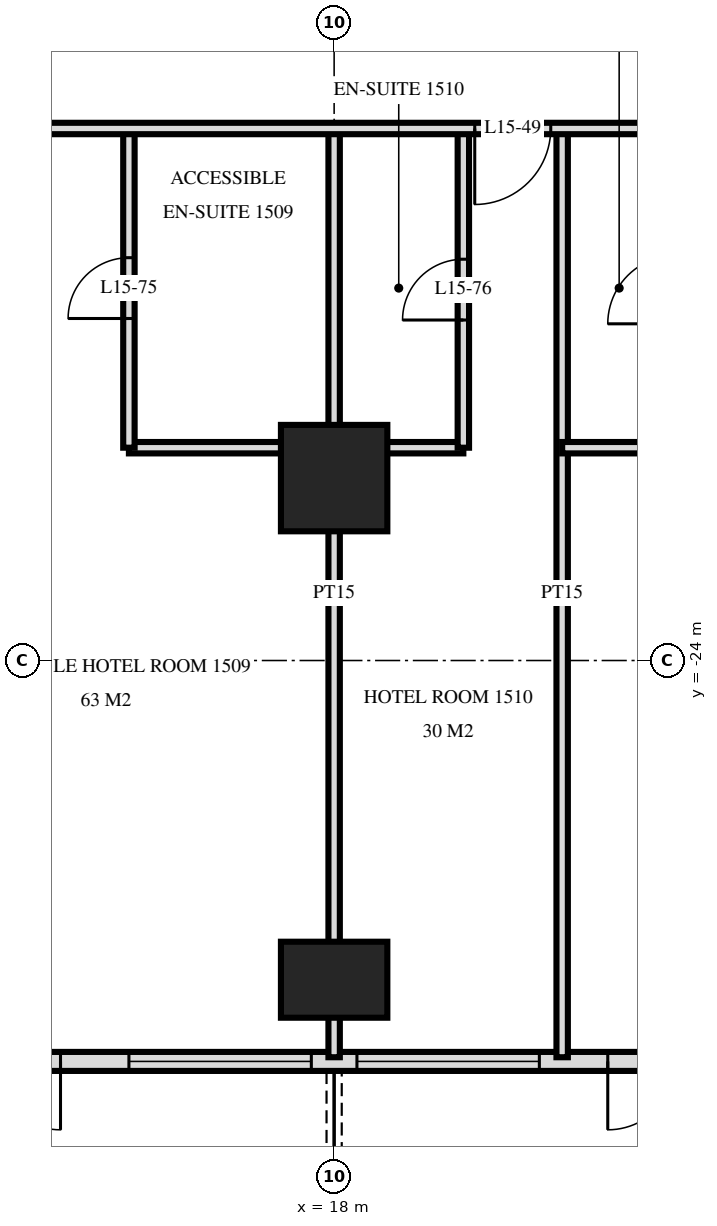
"""IFC4 building model, lengths in metres.
Left out: names, types, materials, properties, quantities, classifications, styles, units other than length and angle.
Written with IfcOpenShell. Run it as: python <this file> out.ifc"""

import sys

from ifc_helpers import new_model, si_unit, direction, frame, frame_2d, origin, origin_2d, place, context, subcontext, project, spatial, rectangle, extrude, element, fill, save


model = new_model("IFC4")
c1 = context("Model", 3, precision=1e-05, world=origin(), true_north=direction((0.0, 1.0)))
c2 = subcontext(c1, "Body", "Model", "MODEL_VIEW")
j1 = project(units=[si_unit("LENGTHUNIT", "METRE"), si_unit("PLANEANGLEUNIT", "RADIAN")], contexts=[c1])
p1 = place(None, origin())
s1 = spatial("IfcSite", under=j1, at=p1, CompositionType="ELEMENT")
p2 = place(p1, origin())
s2 = spatial("IfcBuilding", under=s1, at=p2, CompositionType="ELEMENT")
p3 = place(p2, frame((0.0, 0.0, 63.6)))
s3 = spatial("IfcBuildingStorey", under=s2, at=p3, CompositionType="ELEMENT", Elevation=63.6)
p4 = place(p3, frame((18.0, -28.2, 0.0), z_axis=(0.0, 0.0, 1.0), x_axis=(1.0, 0.0, 0.0)))
e1 = element("IfcColumn", 1, at=p4, inside=s3, PredefinedType="COLUMN", context=c2, shape_type="SweptSolid", body=[
    extrude(rectangle(XDim=1.4, YDim=1.0, at=origin_2d()), origin(), (0.0, 0.0, 1.0), 3.6),
])
p5 = place(p3, frame((18.0, -21.6, 0.0), z_axis=(0.0, 0.0, 1.0), x_axis=(1.0, 0.0, 0.0)))
e2 = element("IfcColumn", 2, at=p5, inside=s3, PredefinedType="COLUMN", context=c2, shape_type="SweptSolid", body=[
    extrude(rectangle(XDim=1.4, YDim=1.4, at=origin_2d()), origin(), (0.0, 0.0, 1.0), 3.6),
])
p6 = place(p3, frame((-28.775, -29.275, 0.0), z_axis=(0.0, 0.0, 1.0), x_axis=(1.0, 0.0, 0.0)))
e3 = element("IfcWall", 3, at=p6, inside=s3, PredefinedType="SOLIDWALL", context=c2, shape_type="SweptSolid", body=[
    extrude(rectangle(XDim=57.551, YDim=0.25, at=frame_2d((28.775, 0.0))), origin(), (0.0, 0.0, 1.0), 3.32),
])
p7 = place(p6, frame((0.575, 0.0, 0.0)))
e4 = element("IfcOpeningElement", 4, at=p7, cuts=e3, PredefinedType="OPENING", context=c2, shape_type="SweptSolid", body=[
    extrude(rectangle(XDim=1.8, YDim=2.4, at=frame_2d((0.9, 1.2))), frame((0.0, 0.135, 0.0), z_axis=(0.0, -1.0, 0.0), x_axis=(1.0, 0.0, 0.0)), (0.0, 0.0, 1.0), 0.27),
])
p8 = place(p6, frame((5.375, 0.0, 0.0)))
e5 = element("IfcOpeningElement", 5, at=p8, cuts=e3, PredefinedType="OPENING", context=c2, shape_type="SweptSolid", body=[
    extrude(rectangle(XDim=1.8, YDim=2.4, at=frame_2d((0.9, 1.2))), frame((0.0, 0.135, 0.0), z_axis=(0.0, -1.0, 0.0), x_axis=(1.0, 0.0, 0.0)), (0.0, 0.0, 1.0), 0.27),
])
p9 = place(p6, frame((8.075, 0.0, 0.3)))
e6 = element("IfcOpeningElement", 6, at=p9, cuts=e3, PredefinedType="OPENING", context=c2, shape_type="SweptSolid", body=[
    extrude(rectangle(XDim=2.4, YDim=2.1, at=frame_2d((1.2, 1.05))), frame((0.0, 0.135, 0.0), z_axis=(0.0, -1.0, 0.0), x_axis=(1.0, 0.0, 0.0)), (0.0, 0.0, 1.0), 0.27),
])
p10 = place(p6, frame((11.375, 0.0, 0.0)))
e7 = element("IfcOpeningElement", 7, at=p10, cuts=e3, PredefinedType="OPENING", context=c2, shape_type="SweptSolid", body=[
    extrude(rectangle(XDim=1.8, YDim=2.4, at=frame_2d((0.9, 1.2))), frame((0.0, 0.135, 0.0), z_axis=(0.0, -1.0, 0.0), x_axis=(1.0, 0.0, 0.0)), (0.0, 0.0, 1.0), 0.27),
])
p11 = place(p6, frame((14.075, 0.0, 0.3)))
e8 = element("IfcOpeningElement", 8, at=p11, cuts=e3, PredefinedType="OPENING", context=c2, shape_type="SweptSolid", body=[
    extrude(rectangle(XDim=2.4, YDim=2.1, at=frame_2d((1.2, 1.05))), frame((0.0, 0.135, 0.0), z_axis=(0.0, -1.0, 0.0), x_axis=(1.0, 0.0, 0.0)), (0.0, 0.0, 1.0), 0.27),
])
p12 = place(p6, frame((17.375, 0.0, 0.0)))
e9 = element("IfcOpeningElement", 9, at=p12, cuts=e3, PredefinedType="OPENING", context=c2, shape_type="SweptSolid", body=[
    extrude(rectangle(XDim=1.8, YDim=2.4, at=frame_2d((0.9, 1.2))), frame((0.0, 0.135, 0.0), z_axis=(0.0, -1.0, 0.0), x_axis=(1.0, 0.0, 0.0)), (0.0, 0.0, 1.0), 0.27),
])
p13 = place(p6, frame((20.075, 0.0, 0.3)))
e10 = element("IfcOpeningElement", 10, at=p13, cuts=e3, PredefinedType="OPENING", context=c2, shape_type="SweptSolid", body=[
    extrude(rectangle(XDim=2.4, YDim=2.1, at=frame_2d((1.2, 1.05))), frame((0.0, 0.135, 0.0), z_axis=(0.0, -1.0, 0.0), x_axis=(1.0, 0.0, 0.0)), (0.0, 0.0, 1.0), 0.27),
])
p14 = place(p6, frame((23.075, 0.0, 0.3)))
e11 = element("IfcOpeningElement", 11, at=p14, cuts=e3, PredefinedType="OPENING", context=c2, shape_type="SweptSolid", body=[
    extrude(rectangle(XDim=2.4, YDim=2.1, at=frame_2d((1.2, 1.05))), frame((0.0, 0.135, 0.0), z_axis=(0.0, -1.0, 0.0), x_axis=(1.0, 0.0, 0.0)), (0.0, 0.0, 1.0), 0.27),
])
p15 = place(p6, frame((26.375, 0.0, 0.0)))
e12 = element("IfcOpeningElement", 12, at=p15, cuts=e3, PredefinedType="OPENING", context=c2, shape_type="SweptSolid", body=[
    extrude(rectangle(XDim=1.8, YDim=2.4, at=frame_2d((0.9, 1.2))), frame((0.0, 0.135, 0.0), z_axis=(0.0, -1.0, 0.0), x_axis=(1.0, 0.0, 0.0)), (0.0, 0.0, 1.0), 0.27),
])
p16 = place(p6, frame((29.075, 0.0, 0.3)))
e13 = element("IfcOpeningElement", 13, at=p16, cuts=e3, PredefinedType="OPENING", context=c2, shape_type="SweptSolid", body=[
    extrude(rectangle(XDim=2.4, YDim=2.1, at=frame_2d((1.2, 1.05))), frame((0.0, 0.135, 0.0), z_axis=(0.0, -1.0, 0.0), x_axis=(1.0, 0.0, 0.0)), (0.0, 0.0, 1.0), 0.27),
])
p17 = place(p6, frame((32.375, 0.0, 0.0)))
e14 = element("IfcOpeningElement", 14, at=p17, cuts=e3, PredefinedType="OPENING", context=c2, shape_type="SweptSolid", body=[
    extrude(rectangle(XDim=1.8, YDim=2.4, at=frame_2d((0.9, 1.2))), frame((0.0, 0.135, 0.0), z_axis=(0.0, -1.0, 0.0), x_axis=(1.0, 0.0, 0.0)), (0.0, 0.0, 1.0), 0.27),
])
p18 = place(p6, frame((35.375, 0.0, 0.0)))
e15 = element("IfcOpeningElement", 15, at=p18, cuts=e3, PredefinedType="OPENING", context=c2, shape_type="SweptSolid", body=[
    extrude(rectangle(XDim=1.8, YDim=2.4, at=frame_2d((0.9, 1.2))), frame((0.0, 0.135, 0.0), z_axis=(0.0, -1.0, 0.0), x_axis=(1.0, 0.0, 0.0)), (0.0, 0.0, 1.0), 0.27),
])
p19 = place(p6, frame((38.075, 0.0, 0.3)))
e16 = element("IfcOpeningElement", 16, at=p19, cuts=e3, PredefinedType="OPENING", context=c2, shape_type="SweptSolid", body=[
    extrude(rectangle(XDim=2.4, YDim=2.1, at=frame_2d((1.2, 1.05))), frame((0.0, 0.135, 0.0), z_axis=(0.0, -1.0, 0.0), x_axis=(1.0, 0.0, 0.0)), (0.0, 0.0, 1.0), 0.27),
])
p20 = place(p6, frame((41.375, 0.0, 0.0)))
e17 = element("IfcOpeningElement", 17, at=p20, cuts=e3, PredefinedType="OPENING", context=c2, shape_type="SweptSolid", body=[
    extrude(rectangle(XDim=1.8, YDim=2.4, at=frame_2d((0.9, 1.2))), frame((0.0, 0.135, 0.0), z_axis=(0.0, -1.0, 0.0), x_axis=(1.0, 0.0, 0.0)), (0.0, 0.0, 1.0), 0.27),
])
p21 = place(p6, frame((44.075, 0.0, 0.3)))
e18 = element("IfcOpeningElement", 18, at=p21, cuts=e3, PredefinedType="OPENING", context=c2, shape_type="SweptSolid", body=[
    extrude(rectangle(XDim=2.4, YDim=2.1, at=frame_2d((1.2, 1.05))), frame((0.0, 0.135, 0.0), z_axis=(0.0, -1.0, 0.0), x_axis=(1.0, 0.0, 0.0)), (0.0, 0.0, 1.0), 0.27),
])
p22 = place(p6, frame((47.075, 0.0, 0.3)))
e19 = element("IfcOpeningElement", 19, at=p22, cuts=e3, PredefinedType="OPENING", context=c2, shape_type="SweptSolid", body=[
    extrude(rectangle(XDim=2.4, YDim=2.1, at=frame_2d((1.2, 1.05))), frame((0.0, 0.135, 0.0), z_axis=(0.0, -1.0, 0.0), x_axis=(1.0, 0.0, 0.0)), (0.0, 0.0, 1.0), 0.27),
])
p23 = place(p6, frame((50.375, 0.0, 0.0)))
e20 = element("IfcOpeningElement", 20, at=p23, cuts=e3, PredefinedType="OPENING", context=c2, shape_type="SweptSolid", body=[
    extrude(rectangle(XDim=1.8, YDim=2.4, at=frame_2d((0.9, 1.2))), frame((0.0, 0.135, 0.0), z_axis=(0.0, -1.0, 0.0), x_axis=(1.0, 0.0, 0.0)), (0.0, 0.0, 1.0), 0.27),
])
p24 = place(p6, frame((53.375, 0.0, 0.0)))
e21 = element("IfcOpeningElement", 21, at=p24, cuts=e3, PredefinedType="OPENING", context=c2, shape_type="SweptSolid", body=[
    extrude(rectangle(XDim=1.8, YDim=2.4, at=frame_2d((0.9, 1.2))), frame((0.0, 0.135, 0.0), z_axis=(0.0, -1.0, 0.0), x_axis=(1.0, 0.0, 0.0)), (0.0, 0.0, 1.0), 0.27),
])
p25 = place(p3, frame((21.0, -29.22, 0.0), z_axis=(0.0, 0.0, 1.0), x_axis=(0.0, 1.0, 0.0)))
e22 = element("IfcWall", 22, at=p25, inside=s3, PredefinedType="PARTITIONING", context=c2, shape_type="SweptSolid", body=[
    extrude(rectangle(XDim=12.22, YDim=0.15, at=frame_2d((6.11, 0.0))), origin(), (0.0, 0.0, 1.0), 3.32),
])
p26 = place(p3, frame((19.7, -21.2, 0.0), z_axis=(0.0, 0.0, 1.0), x_axis=(0.0, 1.0, 0.0)))
e23 = element("IfcWall", 23, at=p26, inside=s3, PredefinedType="PARTITIONING", context=c2, shape_type="SweptSolid", body=[
    extrude(rectangle(XDim=4.2, YDim=0.15, at=frame_2d((2.1, 0.0))), origin(), (0.0, 0.0, 1.0), 3.32),
])
p27 = place(p26, frame((1.68, 0.0, 0.0)))
e24 = element("IfcOpeningElement", 24, at=p27, cuts=e23, PredefinedType="OPENING", context=c2, shape_type="SweptSolid", body=[
    extrude(rectangle(XDim=0.8, YDim=2.1, at=frame_2d((0.4, 1.05))), frame((0.0, 0.085, 0.0), z_axis=(0.0, -1.0, 0.0), x_axis=(1.0, 0.0, 0.0)), (0.0, 0.0, 1.0), 0.17),
])
p28 = place(p3, frame((18.0, -29.22, 0.0), z_axis=(0.0, 0.0, 1.0), x_axis=(0.0, 1.0, 0.0)))
e25 = element("IfcWall", 25, at=p28, inside=s3, PredefinedType="PARTITIONING", context=c2, shape_type="SweptSolid", body=[
    extrude(rectangle(XDim=12.22, YDim=0.15, at=frame_2d((6.11, 0.0))), origin(), (0.0, 0.0, 1.0), 3.32),
])
p29 = place(p3, frame((15.3, -21.2, 0.0), z_axis=(0.0, 0.0, 1.0), x_axis=(0.0, 1.0, 0.0)))
e26 = element("IfcWall", 26, at=p29, inside=s3, PredefinedType="PARTITIONING", context=c2, shape_type="SweptSolid", body=[
    extrude(rectangle(XDim=4.2, YDim=0.15, at=frame_2d((2.1, 0.0))), origin(), (0.0, 0.0, 1.0), 3.32),
])
p30 = place(p29, frame((1.7, 0.0, 0.0)))
e27 = element("IfcOpeningElement", 27, at=p30, cuts=e26, PredefinedType="OPENING", context=c2, shape_type="SweptSolid", body=[
    extrude(rectangle(XDim=0.8, YDim=2.1, at=frame_2d((0.4, 1.05))), frame((0.0, 0.085, 0.0), z_axis=(0.0, -1.0, 0.0), x_axis=(1.0, 0.0, 0.0)), (0.0, 0.0, 1.0), 0.17),
])
p31 = place(p3, frame((15.3, -21.2, 0.0), z_axis=(0.0, 0.0, 1.0), x_axis=(1.0, 0.0, 0.0)))
e28 = element("IfcWall", 28, at=p31, inside=s3, PredefinedType="PARTITIONING", context=c2, shape_type="SweptSolid", body=[
    extrude(rectangle(XDim=4.4, YDim=0.15, at=frame_2d((2.2, 0.0))), origin(), (0.0, 0.0, 1.0), 3.32),
])
p32 = place(p3, frame((21.0, -21.2, 0.0), z_axis=(0.0, 0.0, 1.0), x_axis=(1.0, 0.0, 0.0)))
e29 = element("IfcWall", 29, at=p32, inside=s3, PredefinedType="PARTITIONING", context=c2, shape_type="SweptSolid", body=[
    extrude(rectangle(XDim=1.5, YDim=0.15, at=frame_2d((0.75, 0.0))), origin(), (0.0, 0.0, 1.0), 3.32),
])
p33 = place(p3, frame((-33.12, -17.0, 0.0), z_axis=(0.0, 0.0, 1.0), x_axis=(1.0, 0.0, 0.0)))
e30 = element("IfcWall", 30, at=p33, inside=s3, PredefinedType="PARTITIONING", context=c2, shape_type="SweptSolid", body=[
    extrude(rectangle(XDim=66.24, YDim=0.15, at=frame_2d((33.12, 0.0))), origin(), (0.0, 0.0, 1.0), 3.32),
])
p34 = place(p33, frame((12.27, 0.0, 0.0)))
e31 = element("IfcOpeningElement", 31, at=p34, cuts=e30, PredefinedType="OPENING", context=c2, shape_type="SweptSolid", body=[
    extrude(rectangle(XDim=1.0, YDim=2.1, at=frame_2d((0.5, 1.05))), frame((0.0, 0.085, 0.0), z_axis=(0.0, -1.0, 0.0), x_axis=(1.0, 0.0, 0.0)), (0.0, 0.0, 1.0), 0.17),
])
p35 = place(p33, frame((16.97, 0.0, 0.0)))
e32 = element("IfcOpeningElement", 32, at=p35, cuts=e30, PredefinedType="OPENING", context=c2, shape_type="SweptSolid", body=[
    extrude(rectangle(XDim=1.0, YDim=2.1, at=frame_2d((0.5, 1.05))), frame((0.0, 0.085, 0.0), z_axis=(0.0, -1.0, 0.0), x_axis=(1.0, 0.0, 0.0)), (0.0, 0.0, 1.0), 0.17),
])
p36 = place(p33, frame((18.27, 0.0, 0.0)))
e33 = element("IfcOpeningElement", 33, at=p36, cuts=e30, PredefinedType="OPENING", context=c2, shape_type="SweptSolid", body=[
    extrude(rectangle(XDim=1.0, YDim=2.1, at=frame_2d((0.5, 1.05))), frame((0.0, 0.085, 0.0), z_axis=(0.0, -1.0, 0.0), x_axis=(1.0, 0.0, 0.0)), (0.0, 0.0, 1.0), 0.17),
])
p37 = place(p33, frame((22.97, 0.0, 0.0)))
e34 = element("IfcOpeningElement", 34, at=p37, cuts=e30, PredefinedType="OPENING", context=c2, shape_type="SweptSolid", body=[
    extrude(rectangle(XDim=1.0, YDim=2.1, at=frame_2d((0.5, 1.05))), frame((0.0, 0.085, 0.0), z_axis=(0.0, -1.0, 0.0), x_axis=(1.0, 0.0, 0.0)), (0.0, 0.0, 1.0), 0.17),
])
p38 = place(p33, frame((24.27, 0.0, 0.0)))
e35 = element("IfcOpeningElement", 35, at=p38, cuts=e30, PredefinedType="OPENING", context=c2, shape_type="SweptSolid", body=[
    extrude(rectangle(XDim=1.0, YDim=2.1, at=frame_2d((0.5, 1.05))), frame((0.0, 0.085, 0.0), z_axis=(0.0, -1.0, 0.0), x_axis=(1.0, 0.0, 0.0)), (0.0, 0.0, 1.0), 0.17),
])
p39 = place(p33, frame((28.97, 0.0, 0.0)))
e36 = element("IfcOpeningElement", 36, at=p39, cuts=e30, PredefinedType="OPENING", context=c2, shape_type="SweptSolid", body=[
    extrude(rectangle(XDim=1.0, YDim=2.1, at=frame_2d((0.5, 1.05))), frame((0.0, 0.085, 0.0), z_axis=(0.0, -1.0, 0.0), x_axis=(1.0, 0.0, 0.0)), (0.0, 0.0, 1.0), 0.17),
])
p40 = place(p33, frame((30.27, 0.0, 0.0)))
e37 = element("IfcOpeningElement", 37, at=p40, cuts=e30, PredefinedType="OPENING", context=c2, shape_type="SweptSolid", body=[
    extrude(rectangle(XDim=1.0, YDim=2.1, at=frame_2d((0.5, 1.05))), frame((0.0, 0.085, 0.0), z_axis=(0.0, -1.0, 0.0), x_axis=(1.0, 0.0, 0.0)), (0.0, 0.0, 1.0), 0.17),
])
p41 = place(p33, frame((33.82, 0.0, 0.0)))
e38 = element("IfcOpeningElement", 38, at=p41, cuts=e30, PredefinedType="OPENING", context=c2, shape_type="SweptSolid", body=[
    extrude(rectangle(XDim=1.0, YDim=2.1, at=frame_2d((0.5, 1.05))), frame((0.0, 0.085, 0.0), z_axis=(0.0, -1.0, 0.0), x_axis=(1.0, 0.0, 0.0)), (0.0, 0.0, 1.0), 0.17),
])
p42 = place(p33, frame((46.27, 0.0, 0.0)))
e39 = element("IfcOpeningElement", 39, at=p42, cuts=e30, PredefinedType="OPENING", context=c2, shape_type="SweptSolid", body=[
    extrude(rectangle(XDim=1.0, YDim=2.1, at=frame_2d((0.5, 1.05))), frame((0.0, 0.085, 0.0), z_axis=(0.0, -1.0, 0.0), x_axis=(1.0, 0.0, 0.0)), (0.0, 0.0, 1.0), 0.17),
])
p43 = place(p33, frame((52.97, 0.0, 0.0)))
e40 = element("IfcOpeningElement", 40, at=p43, cuts=e30, PredefinedType="OPENING", context=c2, shape_type="SweptSolid", body=[
    extrude(rectangle(XDim=1.0, YDim=2.1, at=frame_2d((0.5, 1.05))), frame((0.0, 0.085, 0.0), z_axis=(0.0, -1.0, 0.0), x_axis=(1.0, 0.0, 0.0)), (0.0, 0.0, 1.0), 0.17),
])
p44 = place(p33, frame((6.05, 0.0, 0.0)))
e41 = element("IfcOpeningElement", 41, at=p44, cuts=e30, PredefinedType="OPENING", context=c2, shape_type="SweptSolid", body=[
    extrude(rectangle(XDim=1.0, YDim=2.1, at=frame_2d((0.5, 1.05))), frame((0.0, 0.085, 0.0), z_axis=(0.0, -1.0, 0.0), x_axis=(1.0, 0.0, 0.0)), (0.0, 0.0, 1.0), 0.17),
])
p45 = place(p33, frame((59.15, 0.0, 0.0)))
e42 = element("IfcOpeningElement", 42, at=p45, cuts=e30, PredefinedType="OPENING", context=c2, shape_type="SweptSolid", body=[
    extrude(rectangle(XDim=1.0, YDim=2.1, at=frame_2d((0.5, 1.05))), frame((0.0, 0.085, 0.0), z_axis=(0.0, -1.0, 0.0), x_axis=(1.0, 0.0, 0.0)), (0.0, 0.0, 1.0), 0.17),
])
p46 = place(p20, frame((0.9, 0.0, 0.0), z_axis=(0.0, 0.0, 1.0), x_axis=(-1.0, 0.0, 0.0)))
e43 = element("IfcDoor", 43, at=p46, inside=s3, OperationType="DOUBLE_DOOR_SINGLE_SWING", PredefinedType="DOOR", context=c2, shape_type="SweptSolid", body=[
    extrude(rectangle(XDim=1.8, YDim=2.4, at=frame_2d((0.0, 1.2))), frame((0.0, -0.025, 0.0), z_axis=(0.0, 1.0, 0.0), x_axis=(-1.0, 0.0, 0.0)), (0.0, 0.0, 1.0), 0.05),
])
fill(e17, e43)
p47 = place(p21, origin())
e44 = element("IfcWindow", 44, at=p47, inside=s3, PartitioningType="SINGLE_PANEL", PredefinedType="WINDOW", context=c2, shape_type="SweptSolid", body=[
    extrude(rectangle(XDim=2.4, YDim=2.1, at=frame_2d((1.2, 1.05))), frame((0.0, 0.03, 0.0), z_axis=(0.0, -1.0, 0.0), x_axis=(1.0, 0.0, 0.0)), (0.0, 0.0, 1.0), 0.06),
])
fill(e18, e44)
p48 = place(p22, origin())
e45 = element("IfcWindow", 45, at=p48, inside=s3, PartitioningType="SINGLE_PANEL", PredefinedType="WINDOW", context=c2, shape_type="SweptSolid", body=[
    extrude(rectangle(XDim=2.4, YDim=2.1, at=frame_2d((1.2, 1.05))), frame((0.0, 0.03, 0.0), z_axis=(0.0, -1.0, 0.0), x_axis=(1.0, 0.0, 0.0)), (0.0, 0.0, 1.0), 0.06),
])
fill(e19, e45)
p49 = place(p23, frame((0.9, 0.0, 0.0), z_axis=(0.0, 0.0, 1.0), x_axis=(-1.0, 0.0, 0.0)))
e46 = element("IfcDoor", 46, at=p49, inside=s3, OperationType="DOUBLE_DOOR_SINGLE_SWING", PredefinedType="DOOR", context=c2, shape_type="SweptSolid", body=[
    extrude(rectangle(XDim=1.8, YDim=2.4, at=frame_2d((0.0, 1.2))), frame((0.0, -0.025, 0.0), z_axis=(0.0, 1.0, 0.0), x_axis=(-1.0, 0.0, 0.0)), (0.0, 0.0, 1.0), 0.05),
])
fill(e20, e46)
p50 = place(p43, frame((0.5, 0.0, 0.0), z_axis=(0.0, 0.0, 1.0), x_axis=(-1.0, 0.0, 0.0)))
e47 = element("IfcDoor", 47, at=p50, inside=s3, OperationType="SINGLE_SWING_LEFT", PredefinedType="DOOR", context=c2, shape_type="SweptSolid", body=[
    extrude(rectangle(XDim=1.0, YDim=2.1, at=frame_2d((0.0, 1.05))), frame((0.0, -0.025, 0.0), z_axis=(0.0, 1.0, 0.0), x_axis=(-1.0, 0.0, 0.0)), (0.0, 0.0, 1.0), 0.05),
])
fill(e40, e47)
p51 = place(p30, origin())
e48 = element("IfcDoor", 48, at=p51, inside=s3, OperationType="SINGLE_SWING_RIGHT", PredefinedType="DOOR", context=c2, shape_type="SweptSolid", body=[
    extrude(rectangle(XDim=0.8, YDim=2.1, at=frame_2d((0.4, 1.05))), frame((0.0, 0.025, 0.0), z_axis=(0.0, -1.0, 0.0), x_axis=(1.0, 0.0, 0.0)), (0.0, 0.0, 1.0), 0.05),
])
fill(e27, e48)
p52 = place(p27, origin())
e49 = element("IfcDoor", 49, at=p52, inside=s3, OperationType="SINGLE_SWING_RIGHT", PredefinedType="DOOR", context=c2, shape_type="SweptSolid", body=[
    extrude(rectangle(XDim=0.8, YDim=2.1, at=frame_2d((0.4, 1.05))), frame((0.0, 0.025, 0.0), z_axis=(0.0, -1.0, 0.0), x_axis=(1.0, 0.0, 0.0)), (0.0, 0.0, 1.0), 0.05),
])
fill(e24, e49)
save(model, sys.argv[1])
